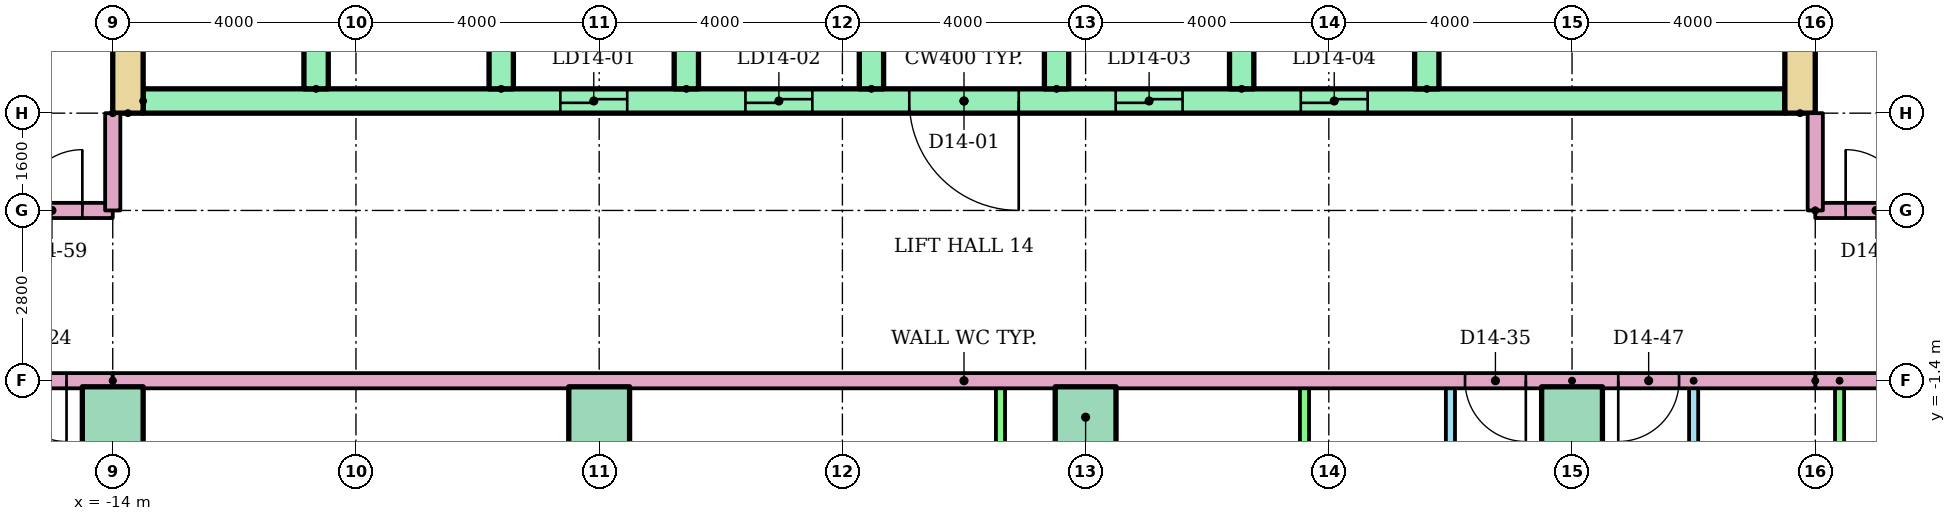
"""IFC4 building model, lengths in metres.
Left out: names, types, materials, properties, quantities, classifications, styles, units other than length and angle.
Written with IfcOpenShell. Run it as: python <this file> out.ifc"""

import sys

from ifc_helpers import new_model, si_unit, direction, frame, frame_2d, origin, origin_2d, place, context, subcontext, project, spatial, rectangle, extrude, element, fill, save


model = new_model("IFC4")
c1 = context("Model", 3, precision=1e-05, world=origin(), true_north=direction((0.0, 1.0)))
c2 = subcontext(c1, "Body", "Model", "MODEL_VIEW")
j1 = project(units=[si_unit("LENGTHUNIT", "METRE"), si_unit("PLANEANGLEUNIT", "RADIAN")], contexts=[c1])
p1 = place(None, origin())
s1 = spatial("IfcSite", under=j1, at=p1, CompositionType="ELEMENT")
p2 = place(p1, origin())
s2 = spatial("IfcBuilding", under=s1, at=p2, CompositionType="ELEMENT")
p3 = place(p2, frame((0.0, 0.0, 54.4)))
s3 = spatial("IfcBuildingStorey", under=s2, at=p3, CompositionType="ELEMENT", Elevation=54.4)
for number, where in (
    (1, (-14.0, -2.0, 0.0)),
    (2, (-6.0, -2.0, 0.0)),
    (3, (2.0, -2.0, 0.0)),
    (4, (10.0, -2.0, 0.0)),
):
    element("IfcColumn", number, at=place(p3, frame(where)), inside=s3, PredefinedType="COLUMN", context=c2, shape_type="SweptSolid", body=[
        extrude(rectangle(XDim=1.0, YDim=1.0, at=origin_2d()), origin(), (0.0, 0.0, 1.0), 3.2),
    ])
for number, where, z_axis, x_axis in (
    (5, (-13.75, 3.0, 0.0), (0.0, 0.0, 1.0), (0.0, 1.0, 0.0)),
    (6, (13.75, 3.0, 0.0), (0.0, 0.0, 1.0), (0.0, 1.0, 0.0)),
):
    element("IfcWall", number, at=place(p3, frame(where, z_axis=z_axis, x_axis=x_axis)), inside=s3, PredefinedType="SHEAR", context=c2, shape_type="SweptSolid", body=[
        extrude(rectangle(XDim=17.0, YDim=0.5, at=frame_2d((8.5, 0.0))), origin(), (0.0, 0.0, 1.0), 2.92),
    ])
p4 = place(p3, frame((-13.5, 3.2, 0.0)))
e7 = element("IfcWall", 7, at=p4, inside=s3, PredefinedType="SHEAR", context=c2, shape_type="SweptSolid", body=[
    extrude(rectangle(XDim=27.0, YDim=0.4, at=frame_2d((13.5, 0.0))), origin(), (0.0, 0.0, 1.0), 2.92),
])
p5 = place(p4, frame((6.861, 0.0, 0.0)))
e8 = element("IfcOpeningElement", 8, at=p5, cuts=e7, PredefinedType="OPENING", context=c2, shape_type="SweptSolid", body=[
    extrude(rectangle(XDim=1.1, YDim=2.1, at=frame_2d((0.55, 1.05))), frame((0.0, 0.21, 0.0), z_axis=(0.0, -1.0, 0.0), x_axis=(1.0, 0.0, 0.0)), (0.0, 0.0, 1.0), 0.42),
])
p6 = place(p4, frame((9.906, 0.0, 0.0)))
e9 = element("IfcOpeningElement", 9, at=p6, cuts=e7, PredefinedType="OPENING", context=c2, shape_type="SweptSolid", body=[
    extrude(rectangle(XDim=1.1, YDim=2.1, at=frame_2d((0.55, 1.05))), frame((0.0, 0.21, 0.0), z_axis=(0.0, -1.0, 0.0), x_axis=(1.0, 0.0, 0.0)), (0.0, 0.0, 1.0), 0.42),
])
p7 = place(p4, frame((15.994, 0.0, 0.0)))
e10 = element("IfcOpeningElement", 10, at=p7, cuts=e7, PredefinedType="OPENING", context=c2, shape_type="SweptSolid", body=[
    extrude(rectangle(XDim=1.1, YDim=2.1, at=frame_2d((0.55, 1.05))), frame((0.0, 0.21, 0.0), z_axis=(0.0, -1.0, 0.0), x_axis=(1.0, 0.0, 0.0)), (0.0, 0.0, 1.0), 0.42),
])
p8 = place(p4, frame((19.039, 0.0, 0.0)))
e11 = element("IfcOpeningElement", 11, at=p8, cuts=e7, PredefinedType="OPENING", context=c2, shape_type="SweptSolid", body=[
    extrude(rectangle(XDim=1.1, YDim=2.1, at=frame_2d((0.55, 1.05))), frame((0.0, 0.21, 0.0), z_axis=(0.0, -1.0, 0.0), x_axis=(1.0, 0.0, 0.0)), (0.0, 0.0, 1.0), 0.42),
])
p9 = place(p4, frame((12.6, 0.0, 0.0)))
e12 = element("IfcOpeningElement", 12, at=p9, cuts=e7, PredefinedType="OPENING", context=c2, shape_type="SweptSolid", body=[
    extrude(rectangle(XDim=1.8, YDim=2.1, at=frame_2d((0.9, 1.05))), frame((0.0, 0.21, 0.0), z_axis=(0.0, -1.0, 0.0), x_axis=(1.0, 0.0, 0.0)), (0.0, 0.0, 1.0), 0.42),
])
for number, where, z_axis, x_axis in (
    (13, (-10.656, 3.4, 0.0), (0.0, 0.0, 1.0), (0.0, 1.0, 0.0)),
    (14, (-7.611, 3.4, 0.0), (0.0, 0.0, 1.0), (0.0, 1.0, 0.0)),
    (15, (-4.567, 3.4, 0.0), (0.0, 0.0, 1.0), (0.0, 1.0, 0.0)),
    (16, (-1.522, 3.4, 0.0), (0.0, 0.0, 1.0), (0.0, 1.0, 0.0)),
    (17, (1.522, 3.4, 0.0), (0.0, 0.0, 1.0), (0.0, 1.0, 0.0)),
    (18, (4.567, 3.4, 0.0), (0.0, 0.0, 1.0), (0.0, 1.0, 0.0)),
    (19, (7.611, 3.4, 0.0), (0.0, 0.0, 1.0), (0.0, 1.0, 0.0)),
):
    element("IfcWall", number, at=place(p3, frame(where, z_axis=z_axis, x_axis=x_axis)), inside=s3, PredefinedType="SHEAR", context=c2, shape_type="SweptSolid", body=[
        extrude(rectangle(XDim=3.0, YDim=0.4, at=frame_2d((1.5, 0.0))), origin(), (0.0, 0.0, 1.0), 2.92),
    ])
p10 = place(p3, frame((8.0, -9.0, 0.0), z_axis=(0.0, 0.0, 1.0), x_axis=(0.0, 1.0, 0.0)))
e20 = element("IfcWall", 20, at=p10, inside=s3, PredefinedType="PARTITIONING", context=c2, shape_type="SweptSolid", body=[
    extrude(rectangle(XDim=7.6, YDim=0.15, at=frame_2d((3.8, 0.0))), origin(), (0.0, 0.0, 1.0), 2.4),
])
p11 = place(p10, frame((5.025, 0.0, 0.0)))
e21 = element("IfcOpeningElement", 21, at=p11, cuts=e20, PredefinedType="OPENING", context=c2, shape_type="SweptSolid", body=[
    extrude(rectangle(XDim=0.9, YDim=2.1, at=frame_2d((0.45, 1.05))), frame((0.0, 0.085, 0.0), z_axis=(0.0, -1.0, 0.0), x_axis=(1.0, 0.0, 0.0)), (0.0, 0.0, 1.0), 0.17),
])
p12 = place(p10, frame((1.275, 0.0, 0.0)))
e22 = element("IfcOpeningElement", 22, at=p12, cuts=e20, PredefinedType="OPENING", context=c2, shape_type="SweptSolid", body=[
    extrude(rectangle(XDim=0.8, YDim=2.1, at=frame_2d((0.4, 1.05))), frame((0.0, 0.085, 0.0), z_axis=(0.0, -1.0, 0.0), x_axis=(1.0, 0.0, 0.0)), (0.0, 0.0, 1.0), 0.17),
])
for number, where, z_axis, x_axis in (
    (23, (5.6, -9.0, 0.0), (0.0, 0.0, 1.0), (0.0, 1.0, 0.0)),
    (24, (0.6, -9.0, 0.0), (0.0, 0.0, 1.0), (0.0, 1.0, 0.0)),
    (25, (-5.9, -9.0, 0.0), (0.0, 0.0, 1.0), (0.0, 1.0, 0.0)),
):
    element("IfcWall", number, at=place(p3, frame(where, z_axis=z_axis, x_axis=x_axis)), inside=s3, PredefinedType="PARTITIONING", context=c2, shape_type="SweptSolid", body=[
        extrude(rectangle(XDim=7.6, YDim=0.15, at=frame_2d((3.8, 0.0))), origin(), (0.0, 0.0, 1.0), 2.4),
    ])
p13 = place(p3, frame((-14.0, -1.4, 0.0), z_axis=(0.0, 0.0, 1.0), x_axis=(0.0, -1.0, 0.0)))
e26 = element("IfcWall", 26, at=p13, inside=s3, PredefinedType="PARTITIONING", context=c2, shape_type="SweptSolid", body=[
    extrude(rectangle(XDim=14.71, YDim=0.25, at=frame_2d((7.355, 0.0))), origin(), (0.0, 0.0, 1.0), 2.4),
])
p14 = place(p3, frame((12.0, -1.4, 0.0), z_axis=(0.0, 0.0, 1.0), x_axis=(0.0, -1.0, 0.0)))
e27 = element("IfcWall", 27, at=p14, inside=s3, PredefinedType="PARTITIONING", context=c2, shape_type="SweptSolid", body=[
    extrude(rectangle(XDim=7.6, YDim=0.15, at=frame_2d((3.8, 0.0))), origin(), (0.0, 0.0, 1.0), 2.4),
])
p15 = place(p14, frame((1.675, 0.0, 0.0)))
e28 = element("IfcOpeningElement", 28, at=p15, cuts=e27, PredefinedType="OPENING", context=c2, shape_type="SweptSolid", body=[
    extrude(rectangle(XDim=0.9, YDim=2.1, at=frame_2d((0.45, 1.05))), frame((0.0, 0.085, 0.0), z_axis=(0.0, -1.0, 0.0), x_axis=(1.0, 0.0, 0.0)), (0.0, 0.0, 1.0), 0.17),
])
p16 = place(p14, frame((5.525, 0.0, 0.0)))
e29 = element("IfcOpeningElement", 29, at=p16, cuts=e27, PredefinedType="OPENING", context=c2, shape_type="SweptSolid", body=[
    extrude(rectangle(XDim=0.8, YDim=2.1, at=frame_2d((0.4, 1.05))), frame((0.0, 0.085, 0.0), z_axis=(0.0, -1.0, 0.0), x_axis=(1.0, 0.0, 0.0)), (0.0, 0.0, 1.0), 0.17),
])
p17 = place(p3, frame((14.4, -1.4, 0.0), z_axis=(0.0, 0.0, 1.0), x_axis=(0.0, -1.0, 0.0)))
e30 = element("IfcWall", 30, at=p17, inside=s3, PredefinedType="PARTITIONING", context=c2, shape_type="SweptSolid", body=[
    extrude(rectangle(XDim=7.6, YDim=0.15, at=frame_2d((3.8, 0.0))), origin(), (0.0, 0.0, 1.0), 2.4),
])
p18 = place(p3, frame((10.0, -1.4, 0.0), z_axis=(0.0, 0.0, 1.0), x_axis=(0.0, -1.0, 0.0)))
e31 = element("IfcWall", 31, at=p18, inside=s3, PredefinedType="PARTITIONING", context=c2, shape_type="SweptSolid", body=[
    extrude(rectangle(XDim=14.71, YDim=0.25, at=frame_2d((7.355, 0.0))), origin(), (0.0, 0.0, 1.0), 2.4),
])
p19 = place(p3, frame((-14.0, -1.4, 0.0), z_axis=(0.0, 0.0, 1.0), x_axis=(-1.0, 0.0, 0.0)))
e32 = element("IfcWall", 32, at=p19, inside=s3, PredefinedType="PARTITIONING", context=c2, shape_type="SweptSolid", body=[
    extrude(rectangle(XDim=15.0, YDim=0.25, at=frame_2d((7.5, 0.0))), origin(), (0.0, 0.0, 1.0), 2.4),
])
p20 = place(p19, frame((0.76, 0.0, 0.0)))
e33 = element("IfcOpeningElement", 33, at=p20, cuts=e32, PredefinedType="OPENING", context=c2, shape_type="SweptSolid", body=[
    extrude(rectangle(XDim=1.0, YDim=2.1, at=frame_2d((0.5, 1.05))), frame((0.0, 0.135, 0.0), z_axis=(0.0, -1.0, 0.0), x_axis=(1.0, 0.0, 0.0)), (0.0, 0.0, 1.0), 0.27),
])
p21 = place(p3, frame((29.0, -1.4, 0.0), z_axis=(0.0, 0.0, 1.0), x_axis=(-1.0, 0.0, 0.0)))
e34 = element("IfcWall", 34, at=p21, inside=s3, PredefinedType="PARTITIONING", context=c2, shape_type="SweptSolid", body=[
    extrude(rectangle(XDim=15.0, YDim=0.25, at=frame_2d((7.5, 0.0))), origin(), (0.0, 0.0, 1.0), 2.4),
])
p22 = place(p3, frame((-29.0, 1.4, 0.0)))
e35 = element("IfcWall", 35, at=p22, inside=s3, PredefinedType="PARTITIONING", context=c2, shape_type="SweptSolid", body=[
    extrude(rectangle(XDim=15.0, YDim=0.25, at=frame_2d((7.5, 0.0))), origin(), (0.0, 0.0, 1.0), 2.4),
])
p23 = place(p22, frame((5.24, 0.0, 0.0)))
e36 = element("IfcOpeningElement", 36, at=p23, cuts=e35, PredefinedType="OPENING", context=c2, shape_type="SweptSolid", body=[
    extrude(rectangle(XDim=1.0, YDim=2.1, at=frame_2d((0.5, 1.05))), frame((0.0, 0.135, 0.0), z_axis=(0.0, -1.0, 0.0), x_axis=(1.0, 0.0, 0.0)), (0.0, 0.0, 1.0), 0.27),
])
p24 = place(p22, frame((13.5, 0.0, 0.0)))
e37 = element("IfcOpeningElement", 37, at=p24, cuts=e35, PredefinedType="OPENING", context=c2, shape_type="SweptSolid", body=[
    extrude(rectangle(XDim=1.0, YDim=2.1, at=frame_2d((0.5, 1.05))), frame((0.0, 0.135, 0.0), z_axis=(0.0, -1.0, 0.0), x_axis=(1.0, 0.0, 0.0)), (0.0, 0.0, 1.0), 0.27),
])
p25 = place(p3, frame((14.0, 1.4, 0.0)))
e38 = element("IfcWall", 38, at=p25, inside=s3, PredefinedType="PARTITIONING", context=c2, shape_type="SweptSolid", body=[
    extrude(rectangle(XDim=15.0, YDim=0.25, at=frame_2d((7.5, 0.0))), origin(), (0.0, 0.0, 1.0), 2.4),
])
p26 = place(p25, frame((0.5, 0.0, 0.0)))
e39 = element("IfcOpeningElement", 39, at=p26, cuts=e38, PredefinedType="OPENING", context=c2, shape_type="SweptSolid", body=[
    extrude(rectangle(XDim=1.0, YDim=2.1, at=frame_2d((0.5, 1.05))), frame((0.0, 0.135, 0.0), z_axis=(0.0, -1.0, 0.0), x_axis=(1.0, 0.0, 0.0)), (0.0, 0.0, 1.0), 0.27),
])
p27 = place(p3, frame((14.0, -1.4, 0.0), z_axis=(0.0, 0.0, 1.0), x_axis=(-1.0, 0.0, 0.0)))
e40 = element("IfcWall", 40, at=p27, inside=s3, PredefinedType="PARTITIONING", context=c2, shape_type="SweptSolid", body=[
    extrude(rectangle(XDim=28.0, YDim=0.25, at=frame_2d((14.0, 0.0))), origin(), (0.0, 0.0, 1.0), 2.4),
])
p28 = place(p27, frame((4.76, 0.0, 0.0)))
e41 = element("IfcOpeningElement", 41, at=p28, cuts=e40, PredefinedType="OPENING", context=c2, shape_type="SweptSolid", body=[
    extrude(rectangle(XDim=1.0, YDim=2.1, at=frame_2d((0.5, 1.05))), frame((0.0, 0.135, 0.0), z_axis=(0.0, -1.0, 0.0), x_axis=(1.0, 0.0, 0.0)), (0.0, 0.0, 1.0), 0.27),
])
p29 = place(p27, frame((2.24, 0.0, 0.0)))
e42 = element("IfcOpeningElement", 42, at=p29, cuts=e40, PredefinedType="OPENING", context=c2, shape_type="SweptSolid", body=[
    extrude(rectangle(XDim=1.0, YDim=2.1, at=frame_2d((0.5, 1.05))), frame((0.0, 0.135, 0.0), z_axis=(0.0, -1.0, 0.0), x_axis=(1.0, 0.0, 0.0)), (0.0, 0.0, 1.0), 0.27),
])
for number, where, z_axis, x_axis in (
    (43, (-14.0, 3.0, 0.0), (0.0, 0.0, 1.0), (0.0, -1.0, 0.0)),
    (44, (14.0, 1.4, 0.0), (0.0, 0.0, 1.0), (0.0, 1.0, 0.0)),
):
    element("IfcWall", number, at=place(p3, frame(where, z_axis=z_axis, x_axis=x_axis)), inside=s3, PredefinedType="PARTITIONING", context=c2, shape_type="SweptSolid", body=[
        extrude(rectangle(XDim=1.6, YDim=0.25, at=frame_2d((0.8, 0.0))), origin(), (0.0, 0.0, 1.0), 2.4),
    ])
p30 = place(p5, origin())
e45 = element("IfcDoor", 45, at=p30, inside=s3, OperationType="SLIDING_TO_LEFT", PredefinedType="DOOR", context=c2, shape_type="SweptSolid", body=[
    extrude(rectangle(XDim=1.1, YDim=2.1, at=frame_2d((0.55, 1.05))), frame((0.0, 0.025, 0.0), z_axis=(0.0, -1.0, 0.0), x_axis=(1.0, 0.0, 0.0)), (0.0, 0.0, 1.0), 0.05),
])
fill(e8, e45)
p31 = place(p6, origin())
e46 = element("IfcDoor", 46, at=p31, inside=s3, OperationType="SLIDING_TO_LEFT", PredefinedType="DOOR", context=c2, shape_type="SweptSolid", body=[
    extrude(rectangle(XDim=1.1, YDim=2.1, at=frame_2d((0.55, 1.05))), frame((0.0, 0.025, 0.0), z_axis=(0.0, -1.0, 0.0), x_axis=(1.0, 0.0, 0.0)), (0.0, 0.0, 1.0), 0.05),
])
fill(e9, e46)
p32 = place(p7, origin())
e47 = element("IfcDoor", 47, at=p32, inside=s3, OperationType="SLIDING_TO_LEFT", PredefinedType="DOOR", context=c2, shape_type="SweptSolid", body=[
    extrude(rectangle(XDim=1.1, YDim=2.1, at=frame_2d((0.55, 1.05))), frame((0.0, 0.025, 0.0), z_axis=(0.0, -1.0, 0.0), x_axis=(1.0, 0.0, 0.0)), (0.0, 0.0, 1.0), 0.05),
])
fill(e10, e47)
p33 = place(p8, origin())
e48 = element("IfcDoor", 48, at=p33, inside=s3, OperationType="SLIDING_TO_LEFT", PredefinedType="DOOR", context=c2, shape_type="SweptSolid", body=[
    extrude(rectangle(XDim=1.1, YDim=2.1, at=frame_2d((0.55, 1.05))), frame((0.0, 0.025, 0.0), z_axis=(0.0, -1.0, 0.0), x_axis=(1.0, 0.0, 0.0)), (0.0, 0.0, 1.0), 0.05),
])
fill(e11, e48)
p34 = place(p9, frame((1.8, 0.0, 0.0), z_axis=(0.0, 0.0, 1.0), x_axis=(-1.0, 0.0, 0.0)))
e49 = element("IfcDoor", 49, at=p34, inside=s3, OperationType="DOUBLE_DOOR_SINGLE_SWING", PredefinedType="DOOR", context=c2, shape_type="SweptSolid", body=[
    extrude(rectangle(XDim=1.8, YDim=2.1, at=frame_2d((0.9, 1.05))), frame((0.0, 0.025, 0.0), z_axis=(0.0, -1.0, 0.0), x_axis=(1.0, 0.0, 0.0)), (0.0, 0.0, 1.0), 0.05),
])
fill(e12, e49)
p35 = place(p20, origin())
e50 = element("IfcDoor", 50, at=p35, inside=s3, OperationType="SINGLE_SWING_LEFT", PredefinedType="DOOR", context=c2, shape_type="SweptSolid", body=[
    extrude(rectangle(XDim=1.0, YDim=2.1, at=frame_2d((0.5, 1.05))), frame((0.0, 0.025, 0.0), z_axis=(0.0, -1.0, 0.0), x_axis=(1.0, 0.0, 0.0)), (0.0, 0.0, 1.0), 0.05),
])
fill(e33, e50)
p36 = place(p28, origin())
e51 = element("IfcDoor", 51, at=p36, inside=s3, OperationType="SINGLE_SWING_LEFT", PredefinedType="DOOR", context=c2, shape_type="SweptSolid", body=[
    extrude(rectangle(XDim=1.0, YDim=2.1, at=frame_2d((0.5, 1.05))), frame((0.0, 0.025, 0.0), z_axis=(0.0, -1.0, 0.0), x_axis=(1.0, 0.0, 0.0)), (0.0, 0.0, 1.0), 0.05),
])
fill(e41, e51)
p37 = place(p29, origin())
e52 = element("IfcDoor", 52, at=p37, inside=s3, OperationType="SINGLE_SWING_RIGHT", PredefinedType="DOOR", context=c2, shape_type="SweptSolid", body=[
    extrude(rectangle(XDim=1.0, YDim=2.1, at=frame_2d((0.5, 1.05))), frame((0.0, 0.025, 0.0), z_axis=(0.0, -1.0, 0.0), x_axis=(1.0, 0.0, 0.0)), (0.0, 0.0, 1.0), 0.05),
])
fill(e42, e52)
p38 = place(p24, origin())
e53 = element("IfcDoor", 53, at=p38, inside=s3, OperationType="SINGLE_SWING_RIGHT", PredefinedType="DOOR", context=c2, shape_type="SweptSolid", body=[
    extrude(rectangle(XDim=1.0, YDim=2.1, at=frame_2d((0.5, 1.05))), frame((0.0, 0.025, 0.0), z_axis=(0.0, -1.0, 0.0), x_axis=(1.0, 0.0, 0.0)), (0.0, 0.0, 1.0), 0.05),
])
fill(e37, e53)
p39 = place(p26, origin())
e54 = element("IfcDoor", 54, at=p39, inside=s3, OperationType="SINGLE_SWING_LEFT", PredefinedType="DOOR", context=c2, shape_type="SweptSolid", body=[
    extrude(rectangle(XDim=1.0, YDim=2.1, at=frame_2d((0.5, 1.05))), frame((0.0, 0.025, 0.0), z_axis=(0.0, -1.0, 0.0), x_axis=(1.0, 0.0, 0.0)), (0.0, 0.0, 1.0), 0.05),
])
fill(e39, e54)
save(model, sys.argv[1])
